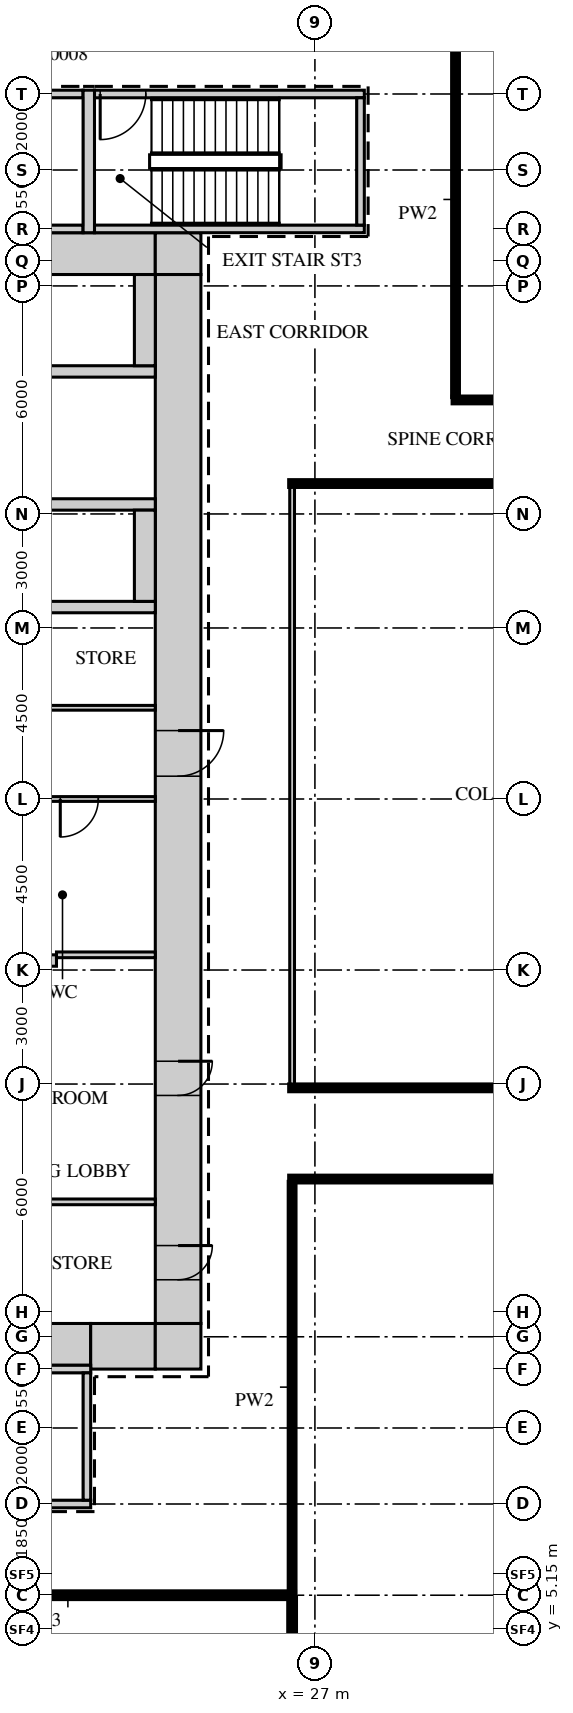
"""IFC4 building model, lengths in metres.
Left out: names, types, materials, properties, quantities, classifications, styles, units other than length and angle.
Written with IfcOpenShell. Run it as: python <this file> out.ifc"""

import sys

from ifc_helpers import new_model, si_unit, direction, frame, frame_2d, origin, place, context, subcontext, project, spatial, rectangle, extrude, source, transform, mapped, element, fill, save


model = new_model("IFC4")
c1 = context("Model", 3, precision=1e-05, world=origin(), true_north=direction((0.0, 1.0)))
c2 = subcontext(c1, "Body", "Model", "MODEL_VIEW")
j1 = project(units=[si_unit("LENGTHUNIT", "METRE"), si_unit("PLANEANGLEUNIT", "RADIAN")], contexts=[c1])
p1 = place(None, origin())
s1 = spatial("IfcSite", under=j1, at=p1, CompositionType="ELEMENT")
p2 = place(p1, origin())
s2 = spatial("IfcBuilding", under=s1, at=p2, CompositionType="ELEMENT")
p3 = place(p2, frame((0.0, 0.0, -4.5)))
s3 = spatial("IfcBuildingStorey", under=s2, at=p3, CompositionType="ELEMENT", Elevation=-4.5)
m1 = source(origin(), c2, "Body", "SweptSolid", [
    extrude(rectangle(XDim=8.9, YDim=1.1, at=frame_2d((4.45, 0.0))), origin(), (0.0, 0.0, 1.0), 4.15),
])
p4 = place(p3, frame((13.9, 41.35, 0.0), z_axis=(0.0, 0.0, 1.0), x_axis=(1.0, 0.0, 0.0)))
e1 = element("IfcWall", 1, at=p4, inside=s3, PredefinedType="SHEAR", context=c2, shape_type="MappedRepresentation", body=[
    mapped(m1, transform((0.0, 0.0, 0.0))),
])
m2 = source(origin(), c2, "Body", "SweptSolid", [
    extrude(rectangle(XDim=1.2, YDim=1.1, at=frame_2d((0.6, 0.0))), origin(), (0.0, 0.0, 1.0), 4.15),
])
p5 = place(p3, frame((22.8, 41.35, 0.0), z_axis=(0.0, 0.0, 1.0), x_axis=(1.0, 0.0, 0.0)))
e2 = element("IfcWall", 2, at=p5, inside=s3, PredefinedType="SHEAR", context=c2, shape_type="MappedRepresentation", body=[
    mapped(m2, transform((0.0, 0.0, 0.0))),
])
m3 = source(origin(), c2, "Body", "SweptSolid", [
    extrude(rectangle(XDim=7.2, YDim=1.1, at=frame_2d((3.6, 0.0))), origin(), (0.0, 0.0, 1.0), 4.15),
])
p6 = place(p3, frame((13.9, 12.65, 0.0), z_axis=(0.0, 0.0, 1.0), x_axis=(1.0, 0.0, 0.0)))
e3 = element("IfcWall", 3, at=p6, inside=s3, PredefinedType="SHEAR", context=c2, shape_type="MappedRepresentation", body=[
    mapped(m3, transform((0.0, 0.0, 0.0))),
])
m4 = source(origin(), c2, "Body", "SweptSolid", [
    extrude(rectangle(XDim=1.0, YDim=2.1, at=frame_2d((0.5, 1.05))), frame((0.0, 0.56, 0.0), z_axis=(0.0, -1.0, 0.0), x_axis=(1.0, 0.0, 0.0)), (0.0, 0.0, 1.0), 1.12),
])
p7 = place(p6, frame((0.8, 0.0, 0.0)))
e4 = element("IfcOpeningElement", 4, at=p7, cuts=e3, PredefinedType="OPENING", context=c2, shape_type="MappedRepresentation", body=[
    mapped(m4, transform((0.0, 0.0, 0.0))),
])
m5 = source(origin(), c2, "Body", "SweptSolid", [
    extrude(rectangle(XDim=1.7, YDim=1.2, at=frame_2d((0.85, 0.0))), origin(), (0.0, 0.0, 1.0), 4.15),
])
p8 = place(p3, frame((21.1, 12.6, 0.0), z_axis=(0.0, 0.0, 1.0), x_axis=(1.0, 0.0, 0.0)))
e5 = element("IfcWall", 5, at=p8, inside=s3, PredefinedType="SHEAR", context=c2, shape_type="MappedRepresentation", body=[
    mapped(m5, transform((0.0, 0.0, 0.0))),
])
m6 = source(origin(), c2, "Body", "SweptSolid", [
    extrude(rectangle(XDim=1.2, YDim=1.2, at=frame_2d((0.6, 0.0))), origin(), (0.0, 0.0, 1.0), 4.15),
])
p9 = place(p3, frame((22.8, 12.6, 0.0), z_axis=(0.0, 0.0, 1.0), x_axis=(1.0, 0.0, 0.0)))
e6 = element("IfcWall", 6, at=p9, inside=s3, PredefinedType="SHEAR", context=c2, shape_type="MappedRepresentation", body=[
    mapped(m6, transform((0.0, 0.0, 0.0))),
])
m7 = source(origin(), c2, "Body", "SweptSolid", [
    extrude(rectangle(XDim=27.6, YDim=1.2, at=frame_2d((13.8, 0.0))), origin(), (0.0, 0.0, 1.0), 4.15),
])
p10 = place(p3, frame((23.4, 13.2, 0.0), z_axis=(0.0, 0.0, 1.0), x_axis=(0.0, 1.0, 0.0)))
e7 = element("IfcWall", 7, at=p10, inside=s3, PredefinedType="SHEAR", context=c2, shape_type="MappedRepresentation", body=[
    mapped(m7, transform((0.0, 0.0, 0.0))),
])
m8 = source(origin(), c2, "Body", "SweptSolid", [
    extrude(rectangle(XDim=1.2, YDim=2.1, at=frame_2d((0.6, 1.05))), frame((0.0, 0.61, 0.0), z_axis=(0.0, -1.0, 0.0), x_axis=(1.0, 0.0, 0.0)), (0.0, 0.0, 1.0), 1.22),
])
p11 = place(p10, frame((14.4, 0.0, 0.0)))
e8 = element("IfcOpeningElement", 8, at=p11, cuts=e7, PredefinedType="OPENING", context=c2, shape_type="MappedRepresentation", body=[
    mapped(m8, transform((0.0, 0.0, 0.0))),
])
m9 = source(origin(), c2, "Body", "SweptSolid", [
    extrude(rectangle(XDim=0.9, YDim=2.1, at=frame_2d((0.45, 1.05))), frame((0.0, 0.61, 0.0), z_axis=(0.0, -1.0, 0.0), x_axis=(1.0, 0.0, 0.0)), (0.0, 0.0, 1.0), 1.22),
])
p12 = place(p10, frame((1.15, 0.0, 0.0)))
e9 = element("IfcOpeningElement", 9, at=p12, cuts=e7, PredefinedType="OPENING", context=c2, shape_type="MappedRepresentation", body=[
    mapped(m9, transform((0.0, 0.0, 0.0))),
])
p13 = place(p10, frame((6.0, 0.0, 0.0)))
e10 = element("IfcOpeningElement", 10, at=p13, cuts=e7, PredefinedType="OPENING", context=c2, shape_type="MappedRepresentation", body=[
    mapped(m9, transform((0.0, 0.0, 0.0))),
])
m10 = source(origin(), c2, "Body", "SweptSolid", [
    extrude(rectangle(XDim=7.0, YDim=0.2, at=frame_2d((3.5, 0.0))), origin(), (0.0, 0.0, 1.0), 4.15),
])
p14 = place(p3, frame((13.9, 45.55, 0.0), z_axis=(0.0, 0.0, 1.0), x_axis=(1.0, 0.0, 0.0)))
e11 = element("IfcWall", 11, at=p14, inside=s3, PredefinedType="SHEAR", context=c2, shape_type="MappedRepresentation", body=[
    mapped(m10, transform((0.0, 0.0, 0.0))),
])
m11 = source(origin(), c2, "Body", "SweptSolid", [
    extrude(rectangle(XDim=1.2, YDim=2.1, at=frame_2d((0.6, 1.05))), frame((0.0, 0.11, 0.0), z_axis=(0.0, -1.0, 0.0), x_axis=(1.0, 0.0, 0.0)), (0.0, 0.0, 1.0), 0.22),
])
p15 = place(p14, frame((0.35, 0.0, 0.0)))
e12 = element("IfcOpeningElement", 12, at=p15, cuts=e11, PredefinedType="OPENING", context=c2, shape_type="MappedRepresentation", body=[
    mapped(m11, transform((0.0, 0.0, 0.0))),
])
p16 = place(p3, frame((13.9, 42.0, 0.0), z_axis=(0.0, 0.0, 1.0), x_axis=(1.0, 0.0, 0.0)))
e13 = element("IfcWall", 13, at=p16, inside=s3, PredefinedType="SHEAR", context=c2, shape_type="MappedRepresentation", body=[
    mapped(m10, transform((0.0, 0.0, 0.0))),
])
m12 = source(origin(), c2, "Body", "SweptSolid", [
    extrude(rectangle(XDim=5.3, YDim=0.2, at=frame_2d((2.65, 0.0))), origin(), (0.0, 0.0, 1.0), 4.15),
])
p17 = place(p3, frame((15.8, 12.0, 0.0), z_axis=(0.0, 0.0, 1.0), x_axis=(1.0, 0.0, 0.0)))
e14 = element("IfcWall", 14, at=p17, inside=s3, PredefinedType="SHEAR", context=c2, shape_type="MappedRepresentation", body=[
    mapped(m12, transform((0.0, 0.0, 0.0))),
])
m13 = source(origin(), c2, "Body", "SweptSolid", [
    extrude(rectangle(XDim=7.2, YDim=0.2, at=frame_2d((3.6, 0.0))), origin(), (0.0, 0.0, 1.0), 4.15),
])
p18 = place(p3, frame((13.9, 8.45, 0.0), z_axis=(0.0, 0.0, 1.0), x_axis=(1.0, 0.0, 0.0)))
e15 = element("IfcWall", 15, at=p18, inside=s3, PredefinedType="SHEAR", context=c2, shape_type="MappedRepresentation", body=[
    mapped(m13, transform((0.0, 0.0, 0.0))),
])
p19 = place(p18, frame((0.35, 0.0, 0.0)))
e16 = element("IfcOpeningElement", 16, at=p19, cuts=e15, PredefinedType="OPENING", context=c2, shape_type="MappedRepresentation", body=[
    mapped(m11, transform((0.0, 0.0, 0.0))),
])
m14 = source(origin(), c2, "Body", "SweptSolid", [
    extrude(rectangle(XDim=7.1, YDim=0.2, at=frame_2d((3.55, 0.0))), origin(), (0.0, 0.0, 1.0), 4.15),
])
p20 = place(p3, frame((21.2, 45.55, 0.0), z_axis=(0.0, 0.0, 1.0), x_axis=(1.0, 0.0, 0.0)))
e17 = element("IfcWall", 17, at=p20, inside=s3, PredefinedType="SHEAR", context=c2, shape_type="MappedRepresentation", body=[
    mapped(m14, transform((0.0, 0.0, 0.0))),
])
p21 = place(p20, frame((0.15, 0.0, 0.0)))
e18 = element("IfcOpeningElement", 18, at=p21, cuts=e17, PredefinedType="OPENING", context=c2, shape_type="MappedRepresentation", body=[
    mapped(m11, transform((0.0, 0.0, 0.0))),
])
p22 = place(p3, frame((21.2, 42.0, 0.0), z_axis=(0.0, 0.0, 1.0), x_axis=(1.0, 0.0, 0.0)))
e19 = element("IfcWall", 19, at=p22, inside=s3, PredefinedType="SHEAR", context=c2, shape_type="MappedRepresentation", body=[
    mapped(m14, transform((0.0, 0.0, 0.0))),
])
m15 = source(origin(), c2, "Body", "SweptSolid", [
    extrude(rectangle(XDim=3.75, YDim=0.3, at=frame_2d((1.875, 0.0))), origin(), (0.0, 0.0, 1.0), 4.15),
])
p23 = place(p3, frame((21.05, 41.9, 0.0), z_axis=(0.0, 0.0, 1.0), x_axis=(0.0, 1.0, 0.0)))
e20 = element("IfcWall", 20, at=p23, inside=s3, PredefinedType="SHEAR", context=c2, shape_type="MappedRepresentation", body=[
    mapped(m15, transform((0.0, 0.0, 0.0))),
])
m16 = source(origin(), c2, "Body", "SweptSolid", [
    extrude(rectangle(XDim=3.35, YDim=0.2, at=frame_2d((1.675, 0.0))), origin(), (0.0, 0.0, 1.0), 4.15),
])
for number, where, z_axis, x_axis in (
    (21, (21.0, 8.55, 0.0), (0.0, 0.0, 1.0), (0.0, 1.0, 0.0)),
    (22, (28.2, 42.1, 0.0), (0.0, 0.0, 1.0), (0.0, 1.0, 0.0)),
):
    element("IfcWall", number, at=place(p3, frame(where, z_axis=z_axis, x_axis=x_axis)), inside=s3, PredefinedType="SHEAR", context=c2, shape_type="MappedRepresentation", body=[
        mapped(m16, transform((0.0, 0.0, 0.0))),
    ])
m17 = source(origin(), c2, "Body", "SweptSolid", [
    extrude(rectangle(XDim=13.0, YDim=0.3, at=frame_2d((6.5, 0.0))), origin(), (0.0, 0.0, 1.0), 4.15),
])
p24 = place(p3, frame((7.2, 22.75, 0.0), z_axis=(0.0, 0.0, 1.0), x_axis=(1.0, 0.0, 0.0)))
e23 = element("IfcWall", 23, at=p24, inside=s3, PredefinedType="STANDARD", context=c2, shape_type="MappedRepresentation", body=[
    mapped(m17, transform((0.0, 0.0, 0.0))),
])
m18 = source(origin(), c2, "Body", "SweptSolid", [
    extrude(rectangle(XDim=15.6, YDim=0.3, at=frame_2d((7.8, 0.0))), origin(), (0.0, 0.0, 1.0), 4.15),
])
for number, where, z_axis, x_axis in (
    (24, (7.2, 32.05, 0.0), (0.0, 0.0, 1.0), (1.0, 0.0, 0.0)),
    (25, (7.2, 38.25, 0.0), (0.0, 0.0, 1.0), (1.0, 0.0, 0.0)),
    (26, (7.2, 34.75, 0.0), (0.0, 0.0, 1.0), (1.0, 0.0, 0.0)),
):
    element("IfcWall", number, at=place(p3, frame(where, z_axis=z_axis, x_axis=x_axis)), inside=s3, PredefinedType="STANDARD", context=c2, shape_type="MappedRepresentation", body=[
        mapped(m18, transform((0.0, 0.0, 0.0))),
    ])
m19 = source(origin(), c2, "Body", "SweptSolid", [
    extrude(rectangle(XDim=2.4, YDim=0.55, at=frame_2d((1.2, 0.0))), origin(), (0.0, 0.0, 1.0), 4.15),
])
for number, where, z_axis, x_axis in (
    (27, (22.525, 38.4, 0.0), (0.0, 0.0, 1.0), (0.0, 1.0, 0.0)),
    (28, (22.525, 32.2, 0.0), (0.0, 0.0, 1.0), (0.0, 1.0, 0.0)),
):
    element("IfcWall", number, at=place(p3, frame(where, z_axis=z_axis, x_axis=x_axis)), inside=s3, PredefinedType="STANDARD", context=c2, shape_type="MappedRepresentation", body=[
        mapped(m19, transform((0.0, 0.0, 0.0))),
    ])
m20 = source(origin(), c2, "Body", "SweptSolid", [
    extrude(rectangle(XDim=5.45, YDim=0.15, at=frame_2d((2.725, 0.0))), origin(), (0.0, 0.0, 1.0), 4.15),
])
p25 = place(p3, frame((26.4, 0.5, 0.0), z_axis=(0.0, 0.0, 1.0), x_axis=(0.0, 1.0, 0.0)))
e29 = element("IfcWall", 29, at=p25, inside=s3, PredefinedType="PARTITIONING", context=c2, shape_type="MappedRepresentation", body=[
    mapped(m20, transform((0.0, 0.0, 0.0))),
])
m21 = source(origin(), c2, "Body", "SweptSolid", [
    extrude(rectangle(XDim=22.3, YDim=0.15, at=frame_2d((11.15, 0.0))), origin(), (0.0, 0.0, 1.0), 4.15),
])
p26 = place(p3, frame((4.15, 6.05, 0.0), z_axis=(0.0, 0.0, 1.0), x_axis=(1.0, 0.0, 0.0)))
e30 = element("IfcWall", 30, at=p26, inside=s3, PredefinedType="PARTITIONING", context=c2, shape_type="MappedRepresentation", body=[
    mapped(m21, transform((0.0, 0.0, 0.0))),
])
m22 = source(origin(), c2, "Body", "SweptSolid", [
    extrude(rectangle(XDim=1.2, YDim=2.1, at=frame_2d((0.6, 1.05))), frame((0.0, 0.085, 0.0), z_axis=(0.0, -1.0, 0.0), x_axis=(1.0, 0.0, 0.0)), (0.0, 0.0, 1.0), 0.17),
])
p27 = place(p26, frame((9.2, 0.0, 0.0)))
e31 = element("IfcOpeningElement", 31, at=p27, cuts=e30, PredefinedType="OPENING", context=c2, shape_type="MappedRepresentation", body=[
    mapped(m22, transform((0.0, 0.0, 0.0))),
])
m23 = source(origin(), c2, "Body", "SweptSolid", [
    extrude(rectangle(XDim=10.75, YDim=0.125, at=frame_2d((5.375, 0.0))), origin(), (0.0, 0.0, 1.0), 4.15),
])
p28 = place(p3, frame((26.4, 6.15, 0.0), z_axis=(0.0, 0.0, 1.0), x_axis=(0.0, 1.0, 0.0)))
e32 = element("IfcWall", 32, at=p28, inside=s3, PredefinedType="PARTITIONING", context=c2, shape_type="MappedRepresentation", body=[
    mapped(m23, transform((0.0, 0.0, 0.0))),
])
m24 = source(origin(), c2, "Body", "SweptSolid", [
    extrude(rectangle(XDim=6.6, YDim=0.15, at=frame_2d((3.3, 0.0))), origin(), (0.0, 0.0, 1.0), 4.15),
])
p29 = place(p3, frame((16.2, 16.4, 0.0), z_axis=(0.0, 0.0, 1.0), x_axis=(1.0, 0.0, 0.0)))
e33 = element("IfcWall", 33, at=p29, inside=s3, PredefinedType="PARTITIONING", context=c2, shape_type="MappedRepresentation", body=[
    mapped(m24, transform((0.0, 0.0, 0.0))),
])
m25 = source(origin(), c2, "Body", "SweptSolid", [
    extrude(rectangle(XDim=54.15, YDim=0.125, at=frame_2d((27.075, 0.0))), origin(), (0.0, 0.0, 1.0), 4.15),
])
p30 = place(p3, frame((26.35, 17.0, 0.0), z_axis=(0.0, 0.0, 1.0), x_axis=(1.0, 0.0, 0.0)))
e34 = element("IfcWall", 34, at=p30, inside=s3, PredefinedType="PARTITIONING", context=c2, shape_type="MappedRepresentation", body=[
    mapped(m25, transform((0.0, 0.0, 0.0))),
])
m26 = source(origin(), c2, "Body", "SweptSolid", [
    extrude(rectangle(XDim=1.2, YDim=2.1, at=frame_2d((0.6, 1.05))), frame((0.0, 0.073, 0.0), z_axis=(0.0, -1.0, 0.0), x_axis=(1.0, 0.0, 0.0)), (0.0, 0.0, 1.0), 0.145),
])
p31 = place(p30, frame((6.25, 0.0, 0.0)))
e35 = element("IfcOpeningElement", 35, at=p31, cuts=e34, PredefinedType="OPENING", context=c2, shape_type="MappedRepresentation", body=[
    mapped(m26, transform((0.0, 0.0, 0.0))),
])
p32 = place(p30, frame((19.05, 0.0, 0.0)))
e36 = element("IfcOpeningElement", 36, at=p32, cuts=e34, PredefinedType="OPENING", context=c2, shape_type="MappedRepresentation", body=[
    mapped(m26, transform((0.0, 0.0, 0.0))),
])
p33 = place(p30, frame((31.05, 0.0, 0.0)))
e37 = element("IfcOpeningElement", 37, at=p33, cuts=e34, PredefinedType="OPENING", context=c2, shape_type="MappedRepresentation", body=[
    mapped(m26, transform((0.0, 0.0, 0.0))),
])
p34 = place(p30, frame((45.55, 0.0, 0.0)))
e38 = element("IfcOpeningElement", 38, at=p34, cuts=e34, PredefinedType="OPENING", context=c2, shape_type="MappedRepresentation", body=[
    mapped(m26, transform((0.0, 0.0, 0.0))),
])
p35 = place(p3, frame((26.35, 19.4, 0.0), z_axis=(0.0, 0.0, 1.0), x_axis=(1.0, 0.0, 0.0)))
e39 = element("IfcWall", 39, at=p35, inside=s3, PredefinedType="PARTITIONING", context=c2, shape_type="MappedRepresentation", body=[
    mapped(m25, transform((0.0, 0.0, 0.0))),
])
p36 = place(p35, frame((9.25, 0.0, 0.0)))
e40 = element("IfcOpeningElement", 40, at=p36, cuts=e39, PredefinedType="OPENING", context=c2, shape_type="MappedRepresentation", body=[
    mapped(m26, transform((0.0, 0.0, 0.0))),
])
m27 = source(origin(), c2, "Body", "SweptSolid", [
    extrude(rectangle(XDim=15.7, YDim=0.125, at=frame_2d((7.85, 0.0))), origin(), (0.0, 0.0, 1.0), 4.15),
])
p37 = place(p3, frame((26.4, 19.5, 0.0), z_axis=(0.0, 0.0, 1.0), x_axis=(0.0, 1.0, 0.0)))
e41 = element("IfcWall", 41, at=p37, inside=s3, PredefinedType="PARTITIONING", context=c2, shape_type="MappedRepresentation", body=[
    mapped(m27, transform((0.0, 0.0, 0.0))),
])
m28 = source(origin(), c2, "Body", "SweptSolid", [
    extrude(rectangle(XDim=2.6, YDim=0.15, at=frame_2d((1.3, 0.0))), origin(), (0.0, 0.0, 1.0), 4.15),
])
p38 = place(p3, frame((20.2, 22.9, 0.0), z_axis=(0.0, 0.0, 1.0), x_axis=(1.0, 0.0, 0.0)))
e42 = element("IfcWall", 42, at=p38, inside=s3, PredefinedType="PARTITIONING", context=c2, shape_type="MappedRepresentation", body=[
    mapped(m28, transform((0.0, 0.0, 0.0))),
])
m29 = source(origin(), c2, "Body", "SweptSolid", [
    extrude(rectangle(XDim=15.6, YDim=0.125, at=frame_2d((7.8, 0.0))), origin(), (0.0, 0.0, 1.0), 4.15),
])
p39 = place(p3, frame((7.2, 27.0, 0.0), z_axis=(0.0, 0.0, 1.0), x_axis=(1.0, 0.0, 0.0)))
e43 = element("IfcWall", 43, at=p39, inside=s3, PredefinedType="PARTITIONING", context=c2, shape_type="MappedRepresentation", body=[
    mapped(m29, transform((0.0, 0.0, 0.0))),
])
m30 = source(origin(), c2, "Body", "SweptSolid", [
    extrude(rectangle(XDim=0.9, YDim=2.1, at=frame_2d((0.45, 1.05))), frame((0.0, 0.073, 0.0), z_axis=(0.0, -1.0, 0.0), x_axis=(1.0, 0.0, 0.0)), (0.0, 0.0, 1.0), 0.145),
])
p40 = place(p39, frame((2.45, 0.0, 0.0)))
e44 = element("IfcOpeningElement", 44, at=p40, cuts=e43, PredefinedType="OPENING", context=c2, shape_type="MappedRepresentation", body=[
    mapped(m30, transform((0.0, 0.0, 0.0))),
])
p41 = place(p39, frame((8.25, 0.0, 0.0)))
e45 = element("IfcOpeningElement", 45, at=p41, cuts=e43, PredefinedType="OPENING", context=c2, shape_type="MappedRepresentation", body=[
    mapped(m30, transform((0.0, 0.0, 0.0))),
])
m31 = source(origin(), c2, "Body", "SweptSolid", [
    extrude(rectangle(XDim=1.0, YDim=2.1, at=frame_2d((0.5, 1.05))), frame((0.0, 0.073, 0.0), z_axis=(0.0, -1.0, 0.0), x_axis=(1.0, 0.0, 0.0)), (0.0, 0.0, 1.0), 0.145),
])
p42 = place(p39, frame((13.1, 0.0, 0.0)))
e46 = element("IfcOpeningElement", 46, at=p42, cuts=e43, PredefinedType="OPENING", context=c2, shape_type="MappedRepresentation", body=[
    mapped(m31, transform((0.0, 0.0, 0.0))),
])
m32 = source(origin(), c2, "Body", "SweptSolid", [
    extrude(rectangle(XDim=7.65, YDim=0.125, at=frame_2d((3.825, 0.0))), origin(), (0.0, 0.0, 1.0), 4.15),
])
p43 = place(p3, frame((15.15, 29.4, 0.0), z_axis=(0.0, 0.0, 1.0), x_axis=(1.0, 0.0, 0.0)))
e47 = element("IfcWall", 47, at=p43, inside=s3, PredefinedType="PARTITIONING", context=c2, shape_type="MappedRepresentation", body=[
    mapped(m32, transform((0.0, 0.0, 0.0))),
])
p44 = place(p43, frame((3.4, 0.0, 0.0)))
e48 = element("IfcOpeningElement", 48, at=p44, cuts=e47, PredefinedType="OPENING", context=c2, shape_type="MappedRepresentation", body=[
    mapped(m30, transform((0.0, 0.0, 0.0))),
])
p45 = place(p3, frame((26.35, 35.3, 0.0), z_axis=(0.0, 0.0, 1.0), x_axis=(1.0, 0.0, 0.0)))
e49 = element("IfcWall", 49, at=p45, inside=s3, PredefinedType="PARTITIONING", context=c2, shape_type="MappedRepresentation", body=[
    mapped(m25, transform((0.0, 0.0, 0.0))),
])
p46 = place(p45, frame((27.8, 0.0, 0.0)))
e50 = element("IfcOpeningElement", 50, at=p46, cuts=e49, PredefinedType="OPENING", context=c2, shape_type="MappedRepresentation", body=[
    mapped(m26, transform((0.0, 0.0, 0.0))),
])
p47 = place(p45, frame((44.55, 0.0, 0.0)))
e51 = element("IfcOpeningElement", 51, at=p47, cuts=e49, PredefinedType="OPENING", context=c2, shape_type="MappedRepresentation", body=[
    mapped(m26, transform((0.0, 0.0, 0.0))),
])
m33 = source(origin(), c2, "Body", "SweptSolid", [
    extrude(rectangle(XDim=19.3, YDim=0.125, at=frame_2d((9.65, 0.0))), origin(), (0.0, 0.0, 1.0), 4.15),
])
p48 = place(p3, frame((30.65, 37.5, 0.0), z_axis=(0.0, 0.0, 1.0), x_axis=(1.0, 0.0, 0.0)))
e52 = element("IfcWall", 52, at=p48, inside=s3, PredefinedType="PARTITIONING", context=c2, shape_type="MappedRepresentation", body=[
    mapped(m33, transform((0.0, 0.0, 0.0))),
])
p49 = place(p48, frame((9.25, 0.0, 0.0)))
e53 = element("IfcOpeningElement", 53, at=p49, cuts=e52, PredefinedType="OPENING", context=c2, shape_type="MappedRepresentation", body=[
    mapped(m26, transform((0.0, 0.0, 0.0))),
])
m34 = source(origin(), c2, "Body", "SweptSolid", [
    extrude(rectangle(XDim=10.35, YDim=0.125, at=frame_2d((5.175, 0.0))), origin(), (0.0, 0.0, 1.0), 4.15),
])
p50 = place(p3, frame((30.7, 37.6, 0.0), z_axis=(0.0, 0.0, 1.0), x_axis=(0.0, 1.0, 0.0)))
e54 = element("IfcWall", 54, at=p50, inside=s3, PredefinedType="PARTITIONING", context=c2, shape_type="MappedRepresentation", body=[
    mapped(m34, transform((0.0, 0.0, 0.0))),
])
m35 = source(origin(), c2, "Body", "SweptSolid", [
    extrude(rectangle(XDim=1.2, YDim=2.1, at=frame_2d((0.6, 1.05))), frame((0.0, 0.55, 0.0), z_axis=(0.0, -1.0, 0.0), x_axis=(1.0, 0.0, 0.0)), (0.0, 0.0, 1.0), 1.1),
])
p51 = place(p11, origin())
e55 = element("IfcDoor", 55, at=p51, inside=s3, OperationType="SINGLE_SWING_RIGHT", PredefinedType="DOOR", context=c2, shape_type="MappedRepresentation", body=[
    mapped(m35, transform((0.0, 0.0, 0.0))),
])
fill(e8, e55)
m36 = source(origin(), c2, "Body", "SweptSolid", [
    extrude(rectangle(XDim=1.0, YDim=2.1, at=frame_2d((0.5, 1.05))), frame((0.0, 0.025, 0.0), z_axis=(0.0, -1.0, 0.0), x_axis=(1.0, 0.0, 0.0)), (0.0, 0.0, 1.0), 0.05),
])
p52 = place(p42, origin())
e56 = element("IfcDoor", 56, at=p52, inside=s3, OperationType="SINGLE_SWING_LEFT", PredefinedType="DOOR", context=c2, shape_type="MappedRepresentation", body=[
    mapped(m36, transform((0.0, 0.0, 0.0))),
])
fill(e46, e56)
m37 = source(origin(), c2, "Body", "SweptSolid", [
    extrude(rectangle(XDim=0.9, YDim=2.1, at=frame_2d((0.45, 1.05))), frame((0.0, 0.55, 0.0), z_axis=(0.0, -1.0, 0.0), x_axis=(1.0, 0.0, 0.0)), (0.0, 0.0, 1.0), 1.1),
])
p53 = place(p12, origin())
e57 = element("IfcDoor", 57, at=p53, inside=s3, OperationType="SINGLE_SWING_RIGHT", PredefinedType="DOOR", context=c2, shape_type="MappedRepresentation", body=[
    mapped(m37, transform((0.0, 0.0, 0.0))),
])
fill(e9, e57)
p54 = place(p13, origin())
e58 = element("IfcDoor", 58, at=p54, inside=s3, OperationType="SINGLE_SWING_RIGHT", PredefinedType="DOOR", context=c2, shape_type="MappedRepresentation", body=[
    mapped(m37, transform((0.0, 0.0, 0.0))),
])
fill(e10, e58)
m38 = source(origin(), c2, "Body", "SweptSolid", [
    extrude(rectangle(XDim=1.2, YDim=2.1, at=frame_2d((0.6, 1.05))), frame((0.0, 0.025, 0.0), z_axis=(0.0, -1.0, 0.0), x_axis=(1.0, 0.0, 0.0)), (0.0, 0.0, 1.0), 0.05),
])
p55 = place(p21, origin())
e59 = element("IfcDoor", 59, at=p55, inside=s3, OperationType="SINGLE_SWING_LEFT", PredefinedType="DOOR", context=c2, shape_type="MappedRepresentation", body=[
    mapped(m38, transform((0.0, 0.0, 0.0))),
])
fill(e18, e59)
save(model, sys.argv[1])
